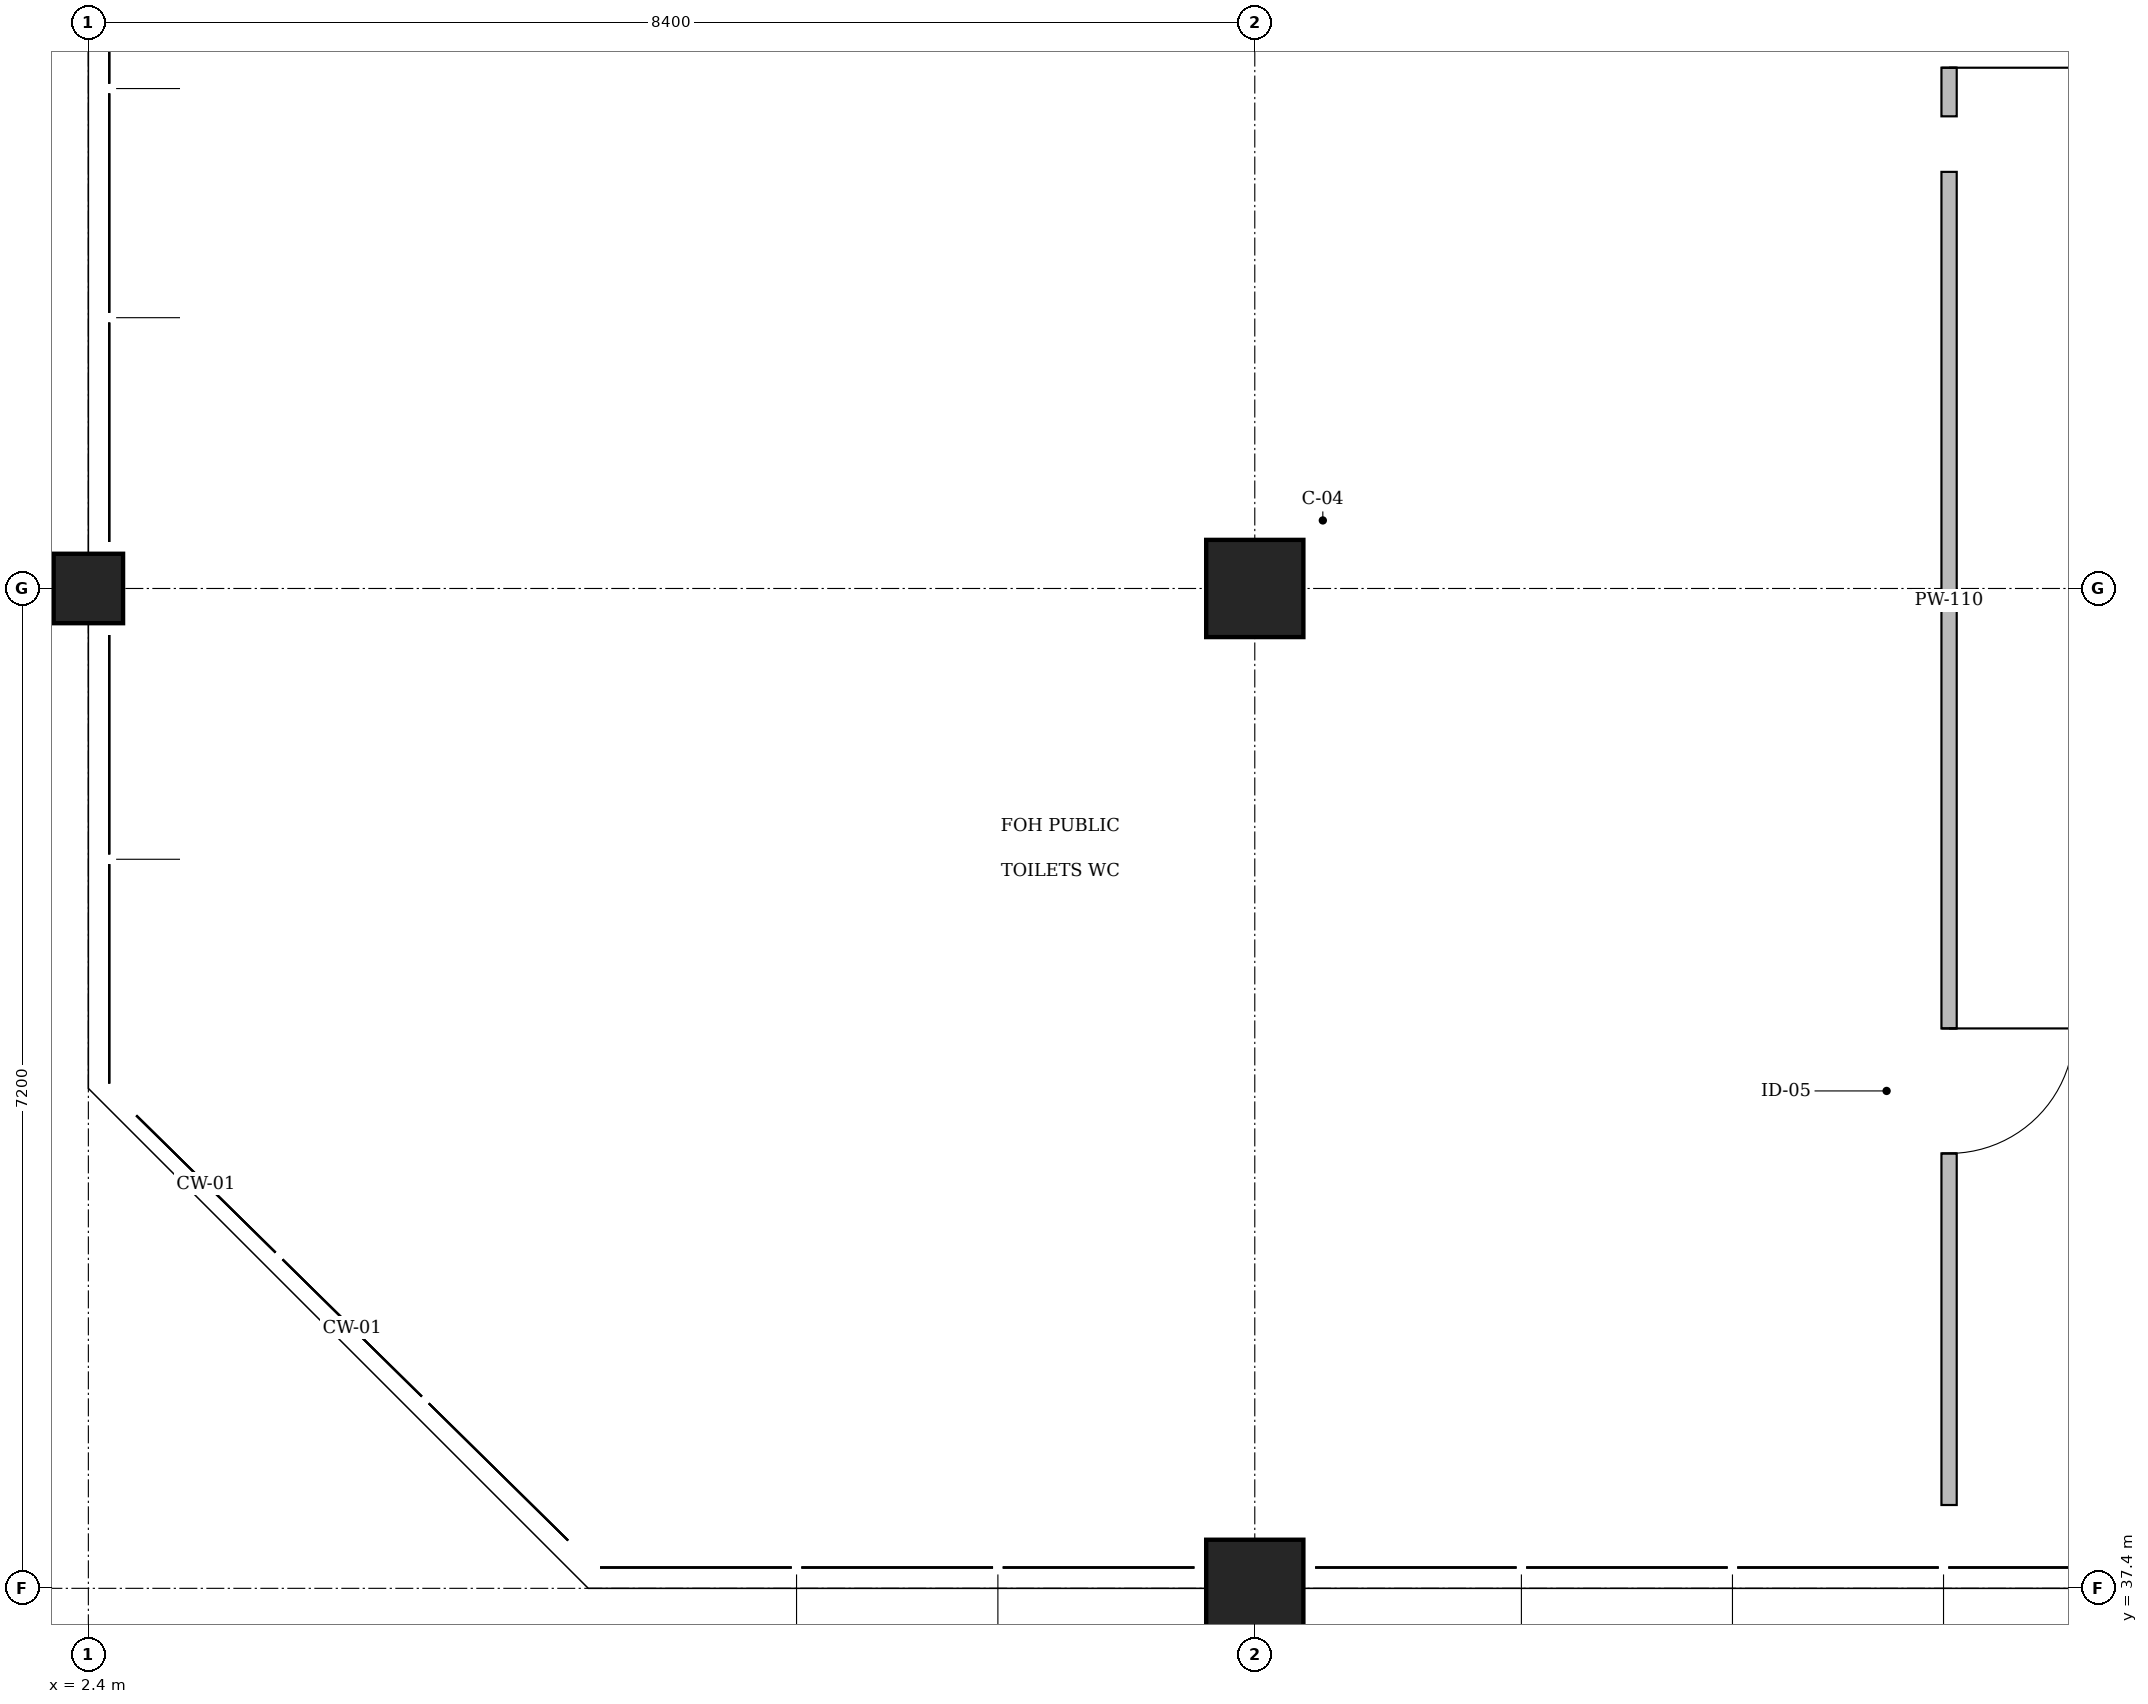
"""IFC4 building model, lengths in metres.
Left out: names, types, materials, properties, quantities, classifications, styles, units other than length and angle.
Written with IfcOpenShell. Run it as: python <this file> out.ifc"""

import sys

from ifc_helpers import new_model, si_unit, direction, frame, frame_2d, origin, origin_2d, place, context, subcontext, project, spatial, rectangle, extrude, element, fill, save


model = new_model("IFC4")
c1 = context("Model", 3, precision=1e-05, world=origin(), true_north=direction((0.0, 1.0)))
c2 = subcontext(c1, "Body", "Model", "MODEL_VIEW")
j1 = project(units=[si_unit("LENGTHUNIT", "METRE"), si_unit("PLANEANGLEUNIT", "RADIAN")], contexts=[c1])
p1 = place(None, origin())
s1 = spatial("IfcSite", under=j1, at=p1, CompositionType="ELEMENT")
p2 = place(p1, origin())
s2 = spatial("IfcBuilding", under=s1, at=p2, CompositionType="ELEMENT")
p3 = place(p2, origin())
s3 = spatial("IfcBuildingStorey", under=s2, at=p3, CompositionType="ELEMENT", Elevation=0.0)
p4 = place(p3, frame((2.4, 44.6, 0.0), z_axis=(0.0, 0.0, 1.0), x_axis=(1.0, 0.0, 0.0)))
e1 = element("IfcColumn", 1, at=p4, inside=s3, PredefinedType="COLUMN", context=c2, shape_type="SweptSolid", body=[
    extrude(rectangle(XDim=0.5, YDim=0.5, at=origin_2d()), origin(), (0.0, 0.0, 1.0), 4.8),
])
p5 = place(p3, frame((10.8, 37.4, 0.0), z_axis=(0.0, 0.0, 1.0), x_axis=(1.0, 0.0, 0.0)))
e2 = element("IfcColumn", 2, at=p5, inside=s3, PredefinedType="COLUMN", context=c2, shape_type="SweptSolid", body=[
    extrude(rectangle(XDim=0.7, YDim=0.7, at=origin_2d()), origin(), (0.0, 0.0, 1.0), 4.66),
])
p6 = place(p3, frame((10.8, 44.6, 0.0), z_axis=(0.0, 0.0, 1.0), x_axis=(1.0, 0.0, 0.0)))
e3 = element("IfcColumn", 3, at=p6, inside=s3, PredefinedType="COLUMN", context=c2, shape_type="SweptSolid", body=[
    extrude(rectangle(XDim=0.7, YDim=0.7, at=origin_2d()), origin(), (0.0, 0.0, 1.0), 4.8),
])
p7 = place(p3, frame((15.8, 47.6, 0.0), z_axis=(0.0, 0.0, 1.0), x_axis=(0.0, -1.0, 0.0)))
e4 = element("IfcWall", 4, at=p7, inside=s3, PredefinedType="PARTITIONING", context=c2, shape_type="SweptSolid", body=[
    extrude(rectangle(XDim=9.6, YDim=0.11, at=frame_2d((4.8, 0.0))), origin(), (0.0, 0.0, 1.0), 4.56),
])
p8 = place(p7, frame((6.168, 0.0, 0.0)))
e5 = element("IfcOpeningElement", 5, at=p8, cuts=e4, PredefinedType="OPENING", context=c2, shape_type="SweptSolid", body=[
    extrude(rectangle(XDim=0.9, YDim=2.15, at=frame_2d((0.45, 1.075))), frame((0.0, 0.075, 0.0), z_axis=(0.0, -1.0, 0.0), x_axis=(1.0, 0.0, 0.0)), (0.0, 0.0, 1.0), 0.15),
])
p9 = place(p3, frame((15.8, 53.6, 0.0), z_axis=(0.0, 0.0, 1.0), x_axis=(0.0, -1.0, 0.0)))
e6 = element("IfcWall", 6, at=p9, inside=s3, PredefinedType="PARTITIONING", context=c2, shape_type="SweptSolid", body=[
    extrude(rectangle(XDim=5.6, YDim=0.11, at=frame_2d((2.8, 0.0))), origin(), (0.0, 0.0, 1.0), 4.54),
])
p10 = place(p9, frame((4.3, 0.0, 0.0)))
e7 = element("IfcOpeningElement", 7, at=p10, cuts=e6, PredefinedType="OPENING", context=c2, shape_type="SweptSolid", body=[
    extrude(rectangle(XDim=0.95, YDim=2.1, at=frame_2d((0.475, 1.05))), frame((0.0, 0.075, 0.0), z_axis=(0.0, -1.0, 0.0), x_axis=(1.0, 0.0, 0.0)), (0.0, 0.0, 1.0), 0.15),
])
p11 = place(p8, origin())
e8 = element("IfcDoor", 8, at=p11, inside=s3, OperationType="SINGLE_SWING_LEFT", PredefinedType="DOOR", context=c2, shape_type="SweptSolid", body=[
    extrude(rectangle(XDim=0.9, YDim=2.15, at=frame_2d((0.45, 1.075))), frame((0.0, 0.025, 0.0), z_axis=(0.0, -1.0, 0.0), x_axis=(1.0, 0.0, 0.0)), (0.0, 0.0, 1.0), 0.05),
])
fill(e5, e8)
p12 = place(p10, origin())
e9 = element("IfcDoor", 9, at=p12, inside=s3, OperationType="SINGLE_SWING_RIGHT", PredefinedType="DOOR", context=c2, shape_type="SweptSolid", body=[
    extrude(rectangle(XDim=0.95, YDim=2.1, at=frame_2d((0.475, 1.05))), frame((0.0, 0.025, 0.0), z_axis=(0.0, -1.0, 0.0), x_axis=(1.0, 0.0, 0.0)), (0.0, 0.0, 1.0), 0.05),
])
fill(e7, e9)
save(model, sys.argv[1])
